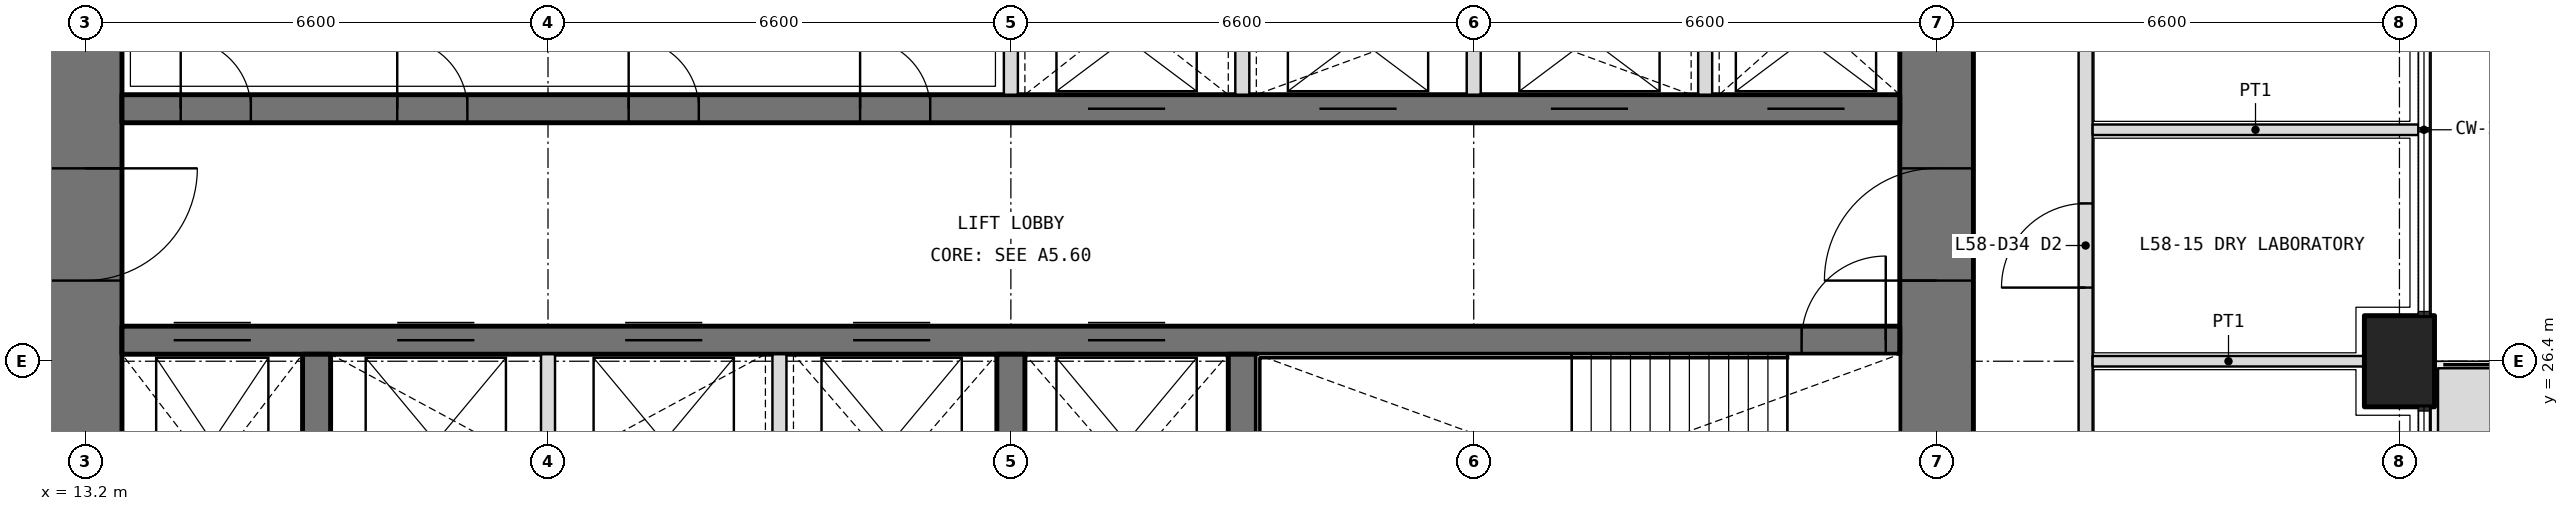
"""IFC4 building model, lengths in metres.
Left out: names, types, materials, properties, quantities, classifications, styles, units other than length and angle.
Written with IfcOpenShell. Run it as: python <this file> out.ifc"""

import sys

from ifc_helpers import new_model, si_unit, direction, frame, frame_2d, origin, origin_2d, place, context, subcontext, project, spatial, polyline, rectangle, outline, extrude, element, fill, save


model = new_model("IFC4")
c1 = context("Model", 3, precision=1e-05, world=origin(), true_north=direction((0.0, 1.0)))
c2 = subcontext(c1, "Body", "Model", "MODEL_VIEW")
j1 = project(units=[si_unit("LENGTHUNIT", "METRE"), si_unit("PLANEANGLEUNIT", "RADIAN")], contexts=[c1])
p1 = place(None, origin())
s1 = spatial("IfcSite", under=j1, at=p1, CompositionType="ELEMENT")
p2 = place(p1, origin())
s2 = spatial("IfcBuilding", under=s1, at=p2, CompositionType="ELEMENT")
p3 = place(p2, frame((0.0, 0.0, 254.4)))
s3 = spatial("IfcBuildingStorey", under=s2, at=p3, CompositionType="ELEMENT", Elevation=254.4)
p4 = place(p3, frame((46.2, 26.4, 0.0), z_axis=(0.0, 0.0, 1.0), x_axis=(0.0, 1.0, 0.0)))
e1 = element("IfcColumn", 1, at=p4, inside=s3, PredefinedType="COLUMN", context=c2, shape_type="SweptSolid", body=[
    extrude(rectangle(XDim=1.3, YDim=1.0, at=origin_2d()), origin(), (0.0, 0.0, 1.0), 4.2),
])
p5 = place(p3, origin())
e2 = element("IfcWall", 2, at=p5, inside=s3, PredefinedType="USERDEFINED", context=c2, shape_type="SweptSolid", body=[
    extrude(outline(polyline([(46.75, 17.25), (47.75, 17.25), (47.75, 26.3), (46.75, 26.3), (46.75, 17.25)]), holes=[polyline([(46.9, 17.4), (47.6, 17.4), (47.6, 26.15), (46.9, 26.15), (46.9, 17.4)])]), origin(), (0.0, 0.0, 1.0), 1.05),
])
p6 = place(p3, frame((39.6, 13.725, 0.0), z_axis=(0.0, 0.0, 1.0), x_axis=(0.0, 1.0, 0.0)))
e3 = element("IfcWall", 3, at=p6, inside=s3, PredefinedType="SHEAR", context=c2, shape_type="SweptSolid", body=[
    extrude(rectangle(XDim=18.75, YDim=1.05, at=frame_2d((9.375, 0.0))), origin(), (0.0, 0.0, 1.0), 4.2),
])
p7 = place(p6, frame((3.025, 0.0, 0.0)))
e4 = element("IfcOpeningElement", 4, at=p7, cuts=e3, PredefinedType="OPENING", context=c2, shape_type="SweptSolid", body=[
    extrude(rectangle(XDim=1.6, YDim=2.1, at=frame_2d((0.8, 1.05))), frame((0.0, 0.535, 0.0), z_axis=(0.0, -1.0, 0.0), x_axis=(1.0, 0.0, 0.0)), (0.0, 0.0, 1.0), 1.07),
])
p8 = place(p6, frame((13.825, 0.0, 0.0)))
e5 = element("IfcOpeningElement", 5, at=p8, cuts=e3, PredefinedType="OPENING", context=c2, shape_type="SweptSolid", body=[
    extrude(rectangle(XDim=1.6, YDim=2.1, at=frame_2d((0.8, 1.05))), frame((0.0, 0.535, 0.0), z_axis=(0.0, -1.0, 0.0), x_axis=(1.0, 0.0, 0.0)), (0.0, 0.0, 1.0), 1.07),
])
p9 = place(p3, frame((13.2, 32.475, 0.0), z_axis=(0.0, 0.0, 1.0), x_axis=(0.0, -1.0, 0.0)))
e6 = element("IfcWall", 6, at=p9, inside=s3, PredefinedType="SHEAR", context=c2, shape_type="SweptSolid", body=[
    extrude(rectangle(XDim=18.75, YDim=1.05, at=frame_2d((9.375, 0.0))), origin(), (0.0, 0.0, 1.0), 4.2),
])
p10 = place(p9, frame((14.125, 0.0, 0.0)))
e7 = element("IfcOpeningElement", 7, at=p10, cuts=e6, PredefinedType="OPENING", context=c2, shape_type="SweptSolid", body=[
    extrude(rectangle(XDim=1.6, YDim=2.1, at=frame_2d((0.8, 1.05))), frame((0.0, 0.535, 0.0), z_axis=(0.0, -1.0, 0.0), x_axis=(1.0, 0.0, 0.0)), (0.0, 0.0, 1.0), 1.07),
])
p11 = place(p9, frame((3.325, 0.0, 0.0)))
e8 = element("IfcOpeningElement", 8, at=p11, cuts=e6, PredefinedType="OPENING", context=c2, shape_type="SweptSolid", body=[
    extrude(rectangle(XDim=1.6, YDim=2.1, at=frame_2d((0.8, 1.05))), frame((0.0, 0.535, 0.0), z_axis=(0.0, -1.0, 0.0), x_axis=(1.0, 0.0, 0.0)), (0.0, 0.0, 1.0), 1.07),
])
p12 = place(p3, frame((13.725, 26.7, 0.0), z_axis=(0.0, 0.0, 1.0), x_axis=(1.0, 0.0, 0.0)))
e9 = element("IfcWall", 9, at=p12, inside=s3, PredefinedType="SHEAR", context=c2, shape_type="SweptSolid", body=[
    extrude(rectangle(XDim=25.35, YDim=0.4, at=frame_2d((12.675, 0.0))), origin(), (0.0, 0.0, 1.0), 4.2),
])
p13 = place(p12, frame((23.95, 0.0, 0.0)))
e10 = element("IfcOpeningElement", 10, at=p13, cuts=e9, PredefinedType="OPENING", context=c2, shape_type="SweptSolid", body=[
    extrude(rectangle(XDim=1.2, YDim=2.1, at=frame_2d((0.6, 1.05))), frame((0.0, 0.21, 0.0), z_axis=(0.0, -1.0, 0.0), x_axis=(1.0, 0.0, 0.0)), (0.0, 0.0, 1.0), 0.42),
])
p14 = place(p12, frame((0.738, 0.0, 0.0)))
e11 = element("IfcOpeningElement", 11, at=p14, cuts=e9, PredefinedType="OPENING", context=c2, shape_type="SweptSolid", body=[
    extrude(rectangle(XDim=1.1, YDim=2.1, at=frame_2d((0.55, 1.05))), frame((0.0, 0.21, 0.0), z_axis=(0.0, -1.0, 0.0), x_axis=(1.0, 0.0, 0.0)), (0.0, 0.0, 1.0), 0.42),
])
p15 = place(p12, frame((3.925, 0.0, 0.0)))
e12 = element("IfcOpeningElement", 12, at=p15, cuts=e9, PredefinedType="OPENING", context=c2, shape_type="SweptSolid", body=[
    extrude(rectangle(XDim=1.1, YDim=2.1, at=frame_2d((0.55, 1.05))), frame((0.0, 0.21, 0.0), z_axis=(0.0, -1.0, 0.0), x_axis=(1.0, 0.0, 0.0)), (0.0, 0.0, 1.0), 0.42),
])
p16 = place(p12, frame((7.175, 0.0, 0.0)))
e13 = element("IfcOpeningElement", 13, at=p16, cuts=e9, PredefinedType="OPENING", context=c2, shape_type="SweptSolid", body=[
    extrude(rectangle(XDim=1.1, YDim=2.1, at=frame_2d((0.55, 1.05))), frame((0.0, 0.21, 0.0), z_axis=(0.0, -1.0, 0.0), x_axis=(1.0, 0.0, 0.0)), (0.0, 0.0, 1.0), 0.42),
])
p17 = place(p12, frame((10.425, 0.0, 0.0)))
e14 = element("IfcOpeningElement", 14, at=p17, cuts=e9, PredefinedType="OPENING", context=c2, shape_type="SweptSolid", body=[
    extrude(rectangle(XDim=1.1, YDim=2.1, at=frame_2d((0.55, 1.05))), frame((0.0, 0.21, 0.0), z_axis=(0.0, -1.0, 0.0), x_axis=(1.0, 0.0, 0.0)), (0.0, 0.0, 1.0), 0.42),
])
p18 = place(p12, frame((13.775, 0.0, 0.0)))
e15 = element("IfcOpeningElement", 15, at=p18, cuts=e9, PredefinedType="OPENING", context=c2, shape_type="SweptSolid", body=[
    extrude(rectangle(XDim=1.1, YDim=2.1, at=frame_2d((0.55, 1.05))), frame((0.0, 0.21, 0.0), z_axis=(0.0, -1.0, 0.0), x_axis=(1.0, 0.0, 0.0)), (0.0, 0.0, 1.0), 0.42),
])
p19 = place(p3, frame((13.725, 30.0, 0.0), z_axis=(0.0, 0.0, 1.0), x_axis=(1.0, 0.0, 0.0)))
e16 = element("IfcWall", 16, at=p19, inside=s3, PredefinedType="SHEAR", context=c2, shape_type="SweptSolid", body=[
    extrude(rectangle(XDim=25.35, YDim=0.4, at=frame_2d((12.675, 0.0))), origin(), (0.0, 0.0, 1.0), 4.2),
])
p20 = place(p19, frame((0.837, 0.0, 0.0)))
e17 = element("IfcOpeningElement", 17, at=p20, cuts=e16, PredefinedType="OPENING", context=c2, shape_type="SweptSolid", body=[
    extrude(rectangle(XDim=1.0, YDim=2.1, at=frame_2d((0.5, 1.05))), frame((0.0, 0.21, 0.0), z_axis=(0.0, -1.0, 0.0), x_axis=(1.0, 0.0, 0.0)), (0.0, 0.0, 1.0), 0.42),
])
p21 = place(p19, frame((3.925, 0.0, 0.0)))
e18 = element("IfcOpeningElement", 18, at=p21, cuts=e16, PredefinedType="OPENING", context=c2, shape_type="SweptSolid", body=[
    extrude(rectangle(XDim=1.0, YDim=2.1, at=frame_2d((0.5, 1.05))), frame((0.0, 0.21, 0.0), z_axis=(0.0, -1.0, 0.0), x_axis=(1.0, 0.0, 0.0)), (0.0, 0.0, 1.0), 0.42),
])
p22 = place(p19, frame((7.225, 0.0, 0.0)))
e19 = element("IfcOpeningElement", 19, at=p22, cuts=e16, PredefinedType="OPENING", context=c2, shape_type="SweptSolid", body=[
    extrude(rectangle(XDim=1.0, YDim=2.1, at=frame_2d((0.5, 1.05))), frame((0.0, 0.21, 0.0), z_axis=(0.0, -1.0, 0.0), x_axis=(1.0, 0.0, 0.0)), (0.0, 0.0, 1.0), 0.42),
])
p23 = place(p19, frame((10.525, 0.0, 0.0)))
e20 = element("IfcOpeningElement", 20, at=p23, cuts=e16, PredefinedType="OPENING", context=c2, shape_type="SweptSolid", body=[
    extrude(rectangle(XDim=1.0, YDim=2.1, at=frame_2d((0.5, 1.05))), frame((0.0, 0.21, 0.0), z_axis=(0.0, -1.0, 0.0), x_axis=(1.0, 0.0, 0.0)), (0.0, 0.0, 1.0), 0.42),
])
p24 = place(p19, frame((13.775, 0.0, 0.0)))
e21 = element("IfcOpeningElement", 21, at=p24, cuts=e16, PredefinedType="OPENING", context=c2, shape_type="SweptSolid", body=[
    extrude(rectangle(XDim=1.1, YDim=2.1, at=frame_2d((0.55, 1.05))), frame((0.0, 0.21, 0.0), z_axis=(0.0, -1.0, 0.0), x_axis=(1.0, 0.0, 0.0)), (0.0, 0.0, 1.0), 0.42),
])
p25 = place(p19, frame((17.075, 0.0, 0.0)))
e22 = element("IfcOpeningElement", 22, at=p25, cuts=e16, PredefinedType="OPENING", context=c2, shape_type="SweptSolid", body=[
    extrude(rectangle(XDim=1.1, YDim=2.1, at=frame_2d((0.55, 1.05))), frame((0.0, 0.21, 0.0), z_axis=(0.0, -1.0, 0.0), x_axis=(1.0, 0.0, 0.0)), (0.0, 0.0, 1.0), 0.42),
])
p26 = place(p19, frame((20.375, 0.0, 0.0)))
e23 = element("IfcOpeningElement", 23, at=p26, cuts=e16, PredefinedType="OPENING", context=c2, shape_type="SweptSolid", body=[
    extrude(rectangle(XDim=1.1, YDim=2.1, at=frame_2d((0.55, 1.05))), frame((0.0, 0.21, 0.0), z_axis=(0.0, -1.0, 0.0), x_axis=(1.0, 0.0, 0.0)), (0.0, 0.0, 1.0), 0.42),
])
p27 = place(p19, frame((23.462, 0.0, 0.0)))
e24 = element("IfcOpeningElement", 24, at=p27, cuts=e16, PredefinedType="OPENING", context=c2, shape_type="SweptSolid", body=[
    extrude(rectangle(XDim=1.1, YDim=2.1, at=frame_2d((0.55, 1.05))), frame((0.0, 0.21, 0.0), z_axis=(0.0, -1.0, 0.0), x_axis=(1.0, 0.0, 0.0)), (0.0, 0.0, 1.0), 0.42),
])
for number, where, z_axis, x_axis in (
    (25, (16.5, 23.15, 0.0), (0.0, 0.0, 1.0), (0.0, 1.0, 0.0)),
    (26, (26.4, 23.15, 0.0), (0.0, 0.0, 1.0), (0.0, 1.0, 0.0)),
    (27, (29.7, 23.15, 0.0), (0.0, 0.0, 1.0), (0.0, 1.0, 0.0)),
):
    element("IfcWall", number, at=place(p3, frame(where, z_axis=z_axis, x_axis=x_axis)), inside=s3, PredefinedType="SHEAR", context=c2, shape_type="SweptSolid", body=[
        extrude(rectangle(XDim=3.35, YDim=0.4, at=frame_2d((1.675, 0.0))), origin(), (0.0, 0.0, 1.0), 4.2),
    ])
for number, where, z_axis, x_axis in (
    (28, (26.4, 30.2, 0.0), (0.0, 0.0, 1.0), (0.0, 1.0, 0.0)),
    (29, (29.7, 30.2, 0.0), (0.0, 0.0, 1.0), (0.0, 1.0, 0.0)),
    (30, (33.0, 30.2, 0.0), (0.0, 0.0, 1.0), (0.0, 1.0, 0.0)),
    (31, (36.3, 30.2, 0.0), (0.0, 0.0, 1.0), (0.0, 1.0, 0.0)),
):
    element("IfcWall", number, at=place(p3, frame(where, z_axis=z_axis, x_axis=x_axis)), inside=s3, PredefinedType="PARTITIONING", context=c2, shape_type="SweptSolid", body=[
        extrude(rectangle(XDim=2.275, YDim=0.2, at=frame_2d((1.138, 0.0))), origin(), (0.0, 0.0, 1.0), 4.2),
    ])
for number, where, z_axis, x_axis in (
    (32, (19.8, 23.15, 0.0), (0.0, 0.0, 1.0), (0.0, 1.0, 0.0)),
    (33, (23.1, 23.15, 0.0), (0.0, 0.0, 1.0), (0.0, 1.0, 0.0)),
):
    element("IfcWall", number, at=place(p3, frame(where, z_axis=z_axis, x_axis=x_axis)), inside=s3, PredefinedType="PARTITIONING", context=c2, shape_type="SweptSolid", body=[
        extrude(rectangle(XDim=3.35, YDim=0.2, at=frame_2d((1.675, 0.0))), origin(), (0.0, 0.0, 1.0), 4.2),
    ])
p28 = place(p3, frame((41.725, 7.4, 0.0), z_axis=(0.0, 0.0, 1.0), x_axis=(0.0, 1.0, 0.0)))
e34 = element("IfcWall", 34, at=p28, inside=s3, PredefinedType="PARTITIONING", context=c2, shape_type="SweptSolid", body=[
    extrude(rectangle(XDim=31.4, YDim=0.2, at=frame_2d((15.7, 0.0))), origin(), (0.0, 0.0, 1.0), 3.0),
])
p29 = place(p28, frame((4.0, 0.0, 0.0)))
e35 = element("IfcOpeningElement", 35, at=p29, cuts=e34, PredefinedType="OPENING", context=c2, shape_type="SweptSolid", body=[
    extrude(rectangle(XDim=1.0, YDim=2.1, at=frame_2d((0.5, 1.05))), frame((0.0, 0.11, 0.0), z_axis=(0.0, -1.0, 0.0), x_axis=(1.0, 0.0, 0.0)), (0.0, 0.0, 1.0), 0.22),
])
p30 = place(p28, frame((10.25, 0.0, 0.0)))
e36 = element("IfcOpeningElement", 36, at=p30, cuts=e34, PredefinedType="OPENING", context=c2, shape_type="SweptSolid", body=[
    extrude(rectangle(XDim=1.0, YDim=2.1, at=frame_2d((0.5, 1.05))), frame((0.0, 0.11, 0.0), z_axis=(0.0, -1.0, 0.0), x_axis=(1.0, 0.0, 0.0)), (0.0, 0.0, 1.0), 0.22),
])
p31 = place(p28, frame((13.4, 0.0, 0.0)))
e37 = element("IfcOpeningElement", 37, at=p31, cuts=e34, PredefinedType="OPENING", context=c2, shape_type="SweptSolid", body=[
    extrude(rectangle(XDim=1.0, YDim=2.1, at=frame_2d((0.5, 1.05))), frame((0.0, 0.11, 0.0), z_axis=(0.0, -1.0, 0.0), x_axis=(1.0, 0.0, 0.0)), (0.0, 0.0, 1.0), 0.22),
])
p32 = place(p28, frame((16.75, 0.0, 0.0)))
e38 = element("IfcOpeningElement", 38, at=p32, cuts=e34, PredefinedType="OPENING", context=c2, shape_type="SweptSolid", body=[
    extrude(rectangle(XDim=0.9, YDim=2.1, at=frame_2d((0.45, 1.05))), frame((0.0, 0.11, 0.0), z_axis=(0.0, -1.0, 0.0), x_axis=(1.0, 0.0, 0.0)), (0.0, 0.0, 1.0), 0.22),
])
p33 = place(p28, frame((20.05, 0.0, 0.0)))
e39 = element("IfcOpeningElement", 39, at=p33, cuts=e34, PredefinedType="OPENING", context=c2, shape_type="SweptSolid", body=[
    extrude(rectangle(XDim=1.2, YDim=2.1, at=frame_2d((0.6, 1.05))), frame((0.0, 0.11, 0.0), z_axis=(0.0, -1.0, 0.0), x_axis=(1.0, 0.0, 0.0)), (0.0, 0.0, 1.0), 0.22),
])
p34 = place(p28, frame((26.3, 0.0, 0.0)))
e40 = element("IfcOpeningElement", 40, at=p34, cuts=e34, PredefinedType="OPENING", context=c2, shape_type="SweptSolid", body=[
    extrude(rectangle(XDim=1.2, YDim=2.1, at=frame_2d((0.6, 1.05))), frame((0.0, 0.11, 0.0), z_axis=(0.0, -1.0, 0.0), x_axis=(1.0, 0.0, 0.0)), (0.0, 0.0, 1.0), 0.22),
])
p35 = place(p3, frame((45.7, 26.4, 0.0), z_axis=(0.0, 0.0, 1.0), x_axis=(-1.0, 0.0, 0.0)))
e41 = element("IfcWall", 41, at=p35, inside=s3, PredefinedType="PARTITIONING", context=c2, shape_type="SweptSolid", body=[
    extrude(rectangle(XDim=3.875, YDim=0.15, at=frame_2d((1.938, 0.0))), origin(), (0.0, 0.0, 1.0), 3.0),
])
p36 = place(p3, frame((46.47, 29.7, 0.0), z_axis=(0.0, 0.0, 1.0), x_axis=(-1.0, 0.0, 0.0)))
e42 = element("IfcWall", 42, at=p36, inside=s3, PredefinedType="PARTITIONING", context=c2, shape_type="SweptSolid", body=[
    extrude(rectangle(XDim=4.645, YDim=0.15, at=frame_2d((2.323, 0.0))), origin(), (0.0, 0.0, 1.0), 2.7),
])
p37 = place(p33, origin())
e43 = element("IfcDoor", 43, at=p37, inside=s3, OperationType="DOUBLE_DOOR_SINGLE_SWING", PredefinedType="DOOR", context=c2, shape_type="SweptSolid", body=[
    extrude(rectangle(XDim=1.2, YDim=2.1, at=frame_2d((0.6, 1.05))), frame((0.0, 0.025, 0.0), z_axis=(0.0, -1.0, 0.0), x_axis=(1.0, 0.0, 0.0)), (0.0, 0.0, 1.0), 0.05),
])
fill(e39, e43)
p38 = place(p20, origin())
e44 = element("IfcDoor", 44, at=p38, inside=s3, OperationType="SINGLE_SWING_LEFT", PredefinedType="DOOR", context=c2, shape_type="SweptSolid", body=[
    extrude(rectangle(XDim=1.0, YDim=2.1, at=frame_2d((0.5, 1.05))), frame((0.0, 0.025, 0.0), z_axis=(0.0, -1.0, 0.0), x_axis=(1.0, 0.0, 0.0)), (0.0, 0.0, 1.0), 0.05),
])
fill(e17, e44)
p39 = place(p21, origin())
e45 = element("IfcDoor", 45, at=p39, inside=s3, OperationType="SINGLE_SWING_LEFT", PredefinedType="DOOR", context=c2, shape_type="SweptSolid", body=[
    extrude(rectangle(XDim=1.0, YDim=2.1, at=frame_2d((0.5, 1.05))), frame((0.0, 0.025, 0.0), z_axis=(0.0, -1.0, 0.0), x_axis=(1.0, 0.0, 0.0)), (0.0, 0.0, 1.0), 0.05),
])
fill(e18, e45)
p40 = place(p22, origin())
e46 = element("IfcDoor", 46, at=p40, inside=s3, OperationType="SINGLE_SWING_LEFT", PredefinedType="DOOR", context=c2, shape_type="SweptSolid", body=[
    extrude(rectangle(XDim=1.0, YDim=2.1, at=frame_2d((0.5, 1.05))), frame((0.0, 0.025, 0.0), z_axis=(0.0, -1.0, 0.0), x_axis=(1.0, 0.0, 0.0)), (0.0, 0.0, 1.0), 0.05),
])
fill(e19, e46)
p41 = place(p23, origin())
e47 = element("IfcDoor", 47, at=p41, inside=s3, OperationType="SINGLE_SWING_LEFT", PredefinedType="DOOR", context=c2, shape_type="SweptSolid", body=[
    extrude(rectangle(XDim=1.0, YDim=2.1, at=frame_2d((0.5, 1.05))), frame((0.0, 0.025, 0.0), z_axis=(0.0, -1.0, 0.0), x_axis=(1.0, 0.0, 0.0)), (0.0, 0.0, 1.0), 0.05),
])
fill(e20, e47)
p42 = place(p13, origin())
e48 = element("IfcDoor", 48, at=p42, inside=s3, OperationType="SINGLE_SWING_RIGHT", PredefinedType="DOOR", context=c2, shape_type="SweptSolid", body=[
    extrude(rectangle(XDim=1.2, YDim=2.1, at=frame_2d((0.6, 1.05))), frame((0.0, 0.025, 0.0), z_axis=(0.0, -1.0, 0.0), x_axis=(1.0, 0.0, 0.0)), (0.0, 0.0, 1.0), 0.05),
])
fill(e10, e48)
p43 = place(p11, origin())
e49 = element("IfcDoor", 49, at=p43, inside=s3, OperationType="DOUBLE_DOOR_DOUBLE_SWING", PredefinedType="DOOR", context=c2, shape_type="SweptSolid", body=[
    extrude(rectangle(XDim=1.6, YDim=2.1, at=frame_2d((0.8, 1.05))), frame((0.0, 0.025, 0.0), z_axis=(0.0, -1.0, 0.0), x_axis=(1.0, 0.0, 0.0)), (0.0, 0.0, 1.0), 0.05),
])
fill(e8, e49)
p44 = place(p8, origin())
e50 = element("IfcDoor", 50, at=p44, inside=s3, OperationType="DOUBLE_DOOR_DOUBLE_SWING", PredefinedType="DOOR", context=c2, shape_type="SweptSolid", body=[
    extrude(rectangle(XDim=1.6, YDim=2.1, at=frame_2d((0.8, 1.05))), frame((0.0, 0.025, 0.0), z_axis=(0.0, -1.0, 0.0), x_axis=(1.0, 0.0, 0.0)), (0.0, 0.0, 1.0), 0.05),
])
fill(e5, e50)
p45 = place(p24, origin())
e51 = element("IfcDoor", 51, at=p45, inside=s3, OperationType="DOUBLE_DOOR_SLIDING", PredefinedType="DOOR", context=c2, shape_type="SweptSolid", body=[
    extrude(rectangle(XDim=1.1, YDim=2.1, at=frame_2d((0.55, 1.05))), frame((0.0, 0.025, 0.0), z_axis=(0.0, -1.0, 0.0), x_axis=(1.0, 0.0, 0.0)), (0.0, 0.0, 1.0), 0.05),
])
fill(e21, e51)
p46 = place(p25, origin())
e52 = element("IfcDoor", 52, at=p46, inside=s3, OperationType="DOUBLE_DOOR_SLIDING", PredefinedType="DOOR", context=c2, shape_type="SweptSolid", body=[
    extrude(rectangle(XDim=1.1, YDim=2.1, at=frame_2d((0.55, 1.05))), frame((0.0, 0.025, 0.0), z_axis=(0.0, -1.0, 0.0), x_axis=(1.0, 0.0, 0.0)), (0.0, 0.0, 1.0), 0.05),
])
fill(e22, e52)
p47 = place(p26, origin())
e53 = element("IfcDoor", 53, at=p47, inside=s3, OperationType="DOUBLE_DOOR_SLIDING", PredefinedType="DOOR", context=c2, shape_type="SweptSolid", body=[
    extrude(rectangle(XDim=1.1, YDim=2.1, at=frame_2d((0.55, 1.05))), frame((0.0, 0.025, 0.0), z_axis=(0.0, -1.0, 0.0), x_axis=(1.0, 0.0, 0.0)), (0.0, 0.0, 1.0), 0.05),
])
fill(e23, e53)
p48 = place(p27, origin())
e54 = element("IfcDoor", 54, at=p48, inside=s3, OperationType="DOUBLE_DOOR_SLIDING", PredefinedType="DOOR", context=c2, shape_type="SweptSolid", body=[
    extrude(rectangle(XDim=1.1, YDim=2.1, at=frame_2d((0.55, 1.05))), frame((0.0, 0.025, 0.0), z_axis=(0.0, -1.0, 0.0), x_axis=(1.0, 0.0, 0.0)), (0.0, 0.0, 1.0), 0.05),
])
fill(e24, e54)
p49 = place(p14, origin())
e55 = element("IfcDoor", 55, at=p49, inside=s3, OperationType="DOUBLE_DOOR_SLIDING", PredefinedType="DOOR", context=c2, shape_type="SweptSolid", body=[
    extrude(rectangle(XDim=1.1, YDim=2.1, at=frame_2d((0.55, 1.05))), frame((0.0, 0.025, 0.0), z_axis=(0.0, -1.0, 0.0), x_axis=(1.0, 0.0, 0.0)), (0.0, 0.0, 1.0), 0.05),
])
fill(e11, e55)
p50 = place(p15, origin())
e56 = element("IfcDoor", 56, at=p50, inside=s3, OperationType="DOUBLE_DOOR_SLIDING", PredefinedType="DOOR", context=c2, shape_type="SweptSolid", body=[
    extrude(rectangle(XDim=1.1, YDim=2.1, at=frame_2d((0.55, 1.05))), frame((0.0, 0.025, 0.0), z_axis=(0.0, -1.0, 0.0), x_axis=(1.0, 0.0, 0.0)), (0.0, 0.0, 1.0), 0.05),
])
fill(e12, e56)
p51 = place(p16, origin())
e57 = element("IfcDoor", 57, at=p51, inside=s3, OperationType="DOUBLE_DOOR_SLIDING", PredefinedType="DOOR", context=c2, shape_type="SweptSolid", body=[
    extrude(rectangle(XDim=1.1, YDim=2.1, at=frame_2d((0.55, 1.05))), frame((0.0, 0.025, 0.0), z_axis=(0.0, -1.0, 0.0), x_axis=(1.0, 0.0, 0.0)), (0.0, 0.0, 1.0), 0.05),
])
fill(e13, e57)
p52 = place(p17, origin())
e58 = element("IfcDoor", 58, at=p52, inside=s3, OperationType="DOUBLE_DOOR_SLIDING", PredefinedType="DOOR", context=c2, shape_type="SweptSolid", body=[
    extrude(rectangle(XDim=1.1, YDim=2.1, at=frame_2d((0.55, 1.05))), frame((0.0, 0.025, 0.0), z_axis=(0.0, -1.0, 0.0), x_axis=(1.0, 0.0, 0.0)), (0.0, 0.0, 1.0), 0.05),
])
fill(e14, e58)
p53 = place(p18, origin())
e59 = element("IfcDoor", 59, at=p53, inside=s3, OperationType="DOUBLE_DOOR_SLIDING", PredefinedType="DOOR", context=c2, shape_type="SweptSolid", body=[
    extrude(rectangle(XDim=1.1, YDim=2.1, at=frame_2d((0.55, 1.05))), frame((0.0, 0.025, 0.0), z_axis=(0.0, -1.0, 0.0), x_axis=(1.0, 0.0, 0.0)), (0.0, 0.0, 1.0), 0.05),
])
fill(e15, e59)
save(model, sys.argv[1])
